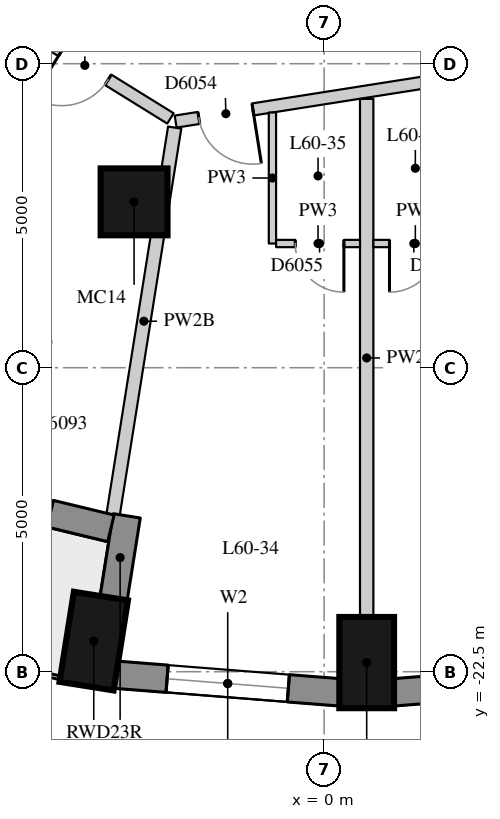
"""IFC4 building model, lengths in metres.
Left out: names, types, materials, properties, quantities, classifications, styles, units other than length and angle.
Written with IfcOpenShell. Run it as: python <this file> out.ifc"""

import sys

from ifc_helpers import new_model, si_unit, direction, frame, frame_2d, origin, origin_2d, place, context, subcontext, project, spatial, rectangle, extrude, element, fill, save


model = new_model("IFC4")
c1 = context("Model", 3, precision=1e-05, world=origin(), true_north=direction((0.0, 1.0)))
c2 = subcontext(c1, "Body", "Model", "MODEL_VIEW")
j1 = project(units=[si_unit("LENGTHUNIT", "METRE"), si_unit("PLANEANGLEUNIT", "RADIAN")], contexts=[c1])
p1 = place(None, origin())
s1 = spatial("IfcSite", under=j1, at=p1, CompositionType="ELEMENT")
p2 = place(p1, origin())
s2 = spatial("IfcBuilding", under=s1, at=p2, CompositionType="ELEMENT")
p3 = place(p2, frame((0.0, 0.0, 212.3)))
s3 = spatial("IfcBuildingStorey", under=s2, at=p3, CompositionType="ELEMENT", Elevation=212.3)
for number, where, z_axis, x_axis in (
    (1, (-3.789, -21.997, 0.0), (0.0, 0.0, 1.0), (-0.157, -0.988, 0.0)),
    (2, (0.7, -22.35, 0.0), (0.0, 0.0, 1.0), (0.0, -1.0, 0.0)),
):
    element("IfcColumn", number, at=place(p3, frame(where, z_axis=z_axis, x_axis=x_axis)), inside=s3, PredefinedType="COLUMN", context=c2, shape_type="SweptSolid", body=[
        extrude(rectangle(XDim=1.5, YDim=0.9, at=origin_2d()), origin(), (0.0, 0.0, 1.0), 3.3),
    ])
p4 = place(p3, frame((-3.126, -14.772, 0.0), z_axis=(0.0, 0.0, 1.0), x_axis=(1.0, 0.0, 0.0)))
e3 = element("IfcColumn", 3, at=p4, inside=s3, PredefinedType="COLUMN", context=c2, shape_type="SweptSolid", body=[
    extrude(rectangle(XDim=1.1, YDim=1.1, at=origin_2d()), origin(), (0.0, 0.0, 1.0), 3.3),
])
p5 = place(p3, frame((-3.441, -22.548, 0.0), z_axis=(0.0, 0.0, 1.0), x_axis=(0.996913971077, -0.078501810629, 0.0)))
e4 = element("IfcWall", 4, at=p5, inside=s3, PredefinedType="SOLIDWALL", context=c2, shape_type="SweptSolid", body=[
    extrude(rectangle(XDim=3.723, YDim=0.45, at=frame_2d((1.861, 0.0))), origin(), (0.0, 0.0, 1.0), 3.02),
])
p6 = place(p5, frame((0.861, 0.0, 0.4)))
e5 = element("IfcOpeningElement", 5, at=p6, cuts=e4, PredefinedType="OPENING", context=c2, shape_type="SweptSolid", body=[
    extrude(rectangle(XDim=2.0, YDim=1.75, at=frame_2d((1.0, 0.875))), frame((0.0, 0.235, 0.0), z_axis=(0.0, -1.0, 0.0), x_axis=(1.0, 0.0, 0.0)), (0.0, 0.0, 1.0), 0.47),
])
p7 = place(p3, frame((1.13, -22.841, 0.0), z_axis=(0.0, 0.0, 1.0), x_axis=(0.996913566885, 0.078506943392, 0.0)))
e6 = element("IfcWall", 6, at=p7, inside=s3, PredefinedType="SOLIDWALL", context=c2, shape_type="SweptSolid", body=[
    extrude(rectangle(XDim=3.722, YDim=0.45, at=frame_2d((1.861, 0.0))), origin(), (0.0, 0.0, 1.0), 3.02),
])
p8 = place(p7, frame((0.861, 0.0, 0.4)))
e7 = element("IfcOpeningElement", 7, at=p8, cuts=e6, PredefinedType="OPENING", context=c2, shape_type="SweptSolid", body=[
    extrude(rectangle(XDim=2.0, YDim=1.75, at=frame_2d((1.0, 0.875))), frame((0.0, 0.235, 0.0), z_axis=(0.0, -1.0, 0.0), x_axis=(1.0, 0.0, 0.0)), (0.0, 0.0, 1.0), 0.47),
])
p9 = place(p3, frame((-3.464, -21.309, 0.0), z_axis=(0.0, 0.0, 1.0), x_axis=(0.157161757203, 0.98757287431, 0.0)))
e8 = element("IfcWall", 8, at=p9, inside=s3, PredefinedType="SOLIDWALL", context=c2, shape_type="SweptSolid", body=[
    extrude(rectangle(XDim=1.39, YDim=0.45, at=frame_2d((0.695, 0.0))), origin(), (0.0, 0.0, 1.0), 2.57),
])
p10 = place(p3, frame((-7.596, -19.154, 0.0), z_axis=(0.0, 0.0, 1.0), x_axis=(0.972004107579, -0.234963858602, 0.0)))
e9 = element("IfcWall", 9, at=p10, inside=s3, PredefinedType="SOLIDWALL", context=c2, shape_type="SweptSolid", body=[
    extrude(rectangle(XDim=4.207, YDim=0.45, at=frame_2d((2.104, 0.0))), origin(), (0.0, 0.0, 1.0), 3.02),
])
p11 = place(p10, frame((1.029, 0.0, 0.4)))
e10 = element("IfcOpeningElement", 10, at=p11, cuts=e9, PredefinedType="OPENING", context=c2, shape_type="SweptSolid", body=[
    extrude(rectangle(XDim=1.0, YDim=1.75, at=frame_2d((0.5, 0.875))), frame((0.0, 0.235, 0.0), z_axis=(0.0, -1.0, 0.0), x_axis=(1.0, 0.0, 0.0)), (0.0, 0.0, 1.0), 0.47),
])
p12 = place(p10, frame((2.179, 0.0, 0.0)))
e11 = element("IfcOpeningElement", 11, at=p12, cuts=e9, PredefinedType="OPENING", context=c2, shape_type="SweptSolid", body=[
    extrude(rectangle(XDim=1.0, YDim=2.15, at=frame_2d((0.5, 1.075))), frame((0.0, 0.235, 0.0), z_axis=(0.0, -1.0, 0.0), x_axis=(1.0, 0.0, 0.0)), (0.0, 0.0, 1.0), 0.47),
])
p13 = place(p3, frame((9.306, -11.603, 0.0), z_axis=(0.0, 0.0, 1.0), x_axis=(-0.987842562114, -0.155457622769, 0.0)))
e12 = element("IfcWall", 12, at=p13, inside=s3, PredefinedType="PARTITIONING", context=c2, shape_type="SweptSolid", body=[
    extrude(rectangle(XDim=11.893, YDim=0.2, at=frame_2d((5.947, 0.0))), origin(), (0.0, 0.0, 1.0), 3.02),
])
p14 = place(p13, frame((10.607, 0.0, 0.0)))
e13 = element("IfcOpeningElement", 13, at=p14, cuts=e12, PredefinedType="OPENING", context=c2, shape_type="SweptSolid", body=[
    extrude(rectangle(XDim=0.9, YDim=2.1, at=frame_2d((0.45, 1.05))), frame((0.0, 0.11, 0.0), z_axis=(0.0, -1.0, 0.0), x_axis=(1.0, 0.0, 0.0)), (0.0, 0.0, 1.0), 0.22),
])
p15 = place(p13, frame((5.829, 0.0, 0.0)))
e14 = element("IfcOpeningElement", 14, at=p15, cuts=e12, PredefinedType="OPENING", context=c2, shape_type="SweptSolid", body=[
    extrude(rectangle(XDim=0.9, YDim=2.1, at=frame_2d((0.45, 1.05))), frame((0.0, 0.11, 0.0), z_axis=(0.0, -1.0, 0.0), x_axis=(1.0, 0.0, 0.0)), (0.0, 0.0, 1.0), 0.22),
])
p16 = place(p13, frame((4.669, 0.0, 0.0)))
e15 = element("IfcOpeningElement", 15, at=p16, cuts=e12, PredefinedType="OPENING", context=c2, shape_type="SweptSolid", body=[
    extrude(rectangle(XDim=0.9, YDim=2.1, at=frame_2d((0.45, 1.05))), frame((0.0, 0.11, 0.0), z_axis=(0.0, -1.0, 0.0), x_axis=(1.0, 0.0, 0.0)), (0.0, 0.0, 1.0), 0.22),
])
p17 = place(p13, frame((0.14, 0.0, 0.0)))
e16 = element("IfcOpeningElement", 16, at=p17, cuts=e12, PredefinedType="OPENING", context=c2, shape_type="SweptSolid", body=[
    extrude(rectangle(XDim=1.1, YDim=2.1, at=frame_2d((0.55, 1.05))), frame((0.0, 0.11, 0.0), z_axis=(0.0, -1.0, 0.0), x_axis=(1.0, 0.0, 0.0)), (0.0, 0.0, 1.0), 0.22),
])
p18 = place(p3, frame((-2.528, -13.4, 0.0), z_axis=(0.0, 0.0, 1.0), x_axis=(-0.850088088191, 0.526640524757, 0.0)))
e17 = element("IfcWall", 17, at=p18, inside=s3, PredefinedType="PARTITIONING", context=c2, shape_type="SweptSolid", body=[
    extrude(rectangle(XDim=6.084, YDim=0.2, at=frame_2d((3.042, 0.0))), origin(), (0.0, 0.0, 1.0), 3.02),
])
p19 = place(p18, frame((4.031, 0.0, 0.0)))
e18 = element("IfcOpeningElement", 18, at=p19, cuts=e17, PredefinedType="OPENING", context=c2, shape_type="SweptSolid", body=[
    extrude(rectangle(XDim=1.1, YDim=2.1, at=frame_2d((0.55, 1.05))), frame((0.0, 0.11, 0.0), z_axis=(0.0, -1.0, 0.0), x_axis=(1.0, 0.0, 0.0)), (0.0, 0.0, 1.0), 0.22),
])
p20 = place(p18, frame((1.206, 0.0, 0.0)))
e19 = element("IfcOpeningElement", 19, at=p20, cuts=e17, PredefinedType="OPENING", context=c2, shape_type="SweptSolid", body=[
    extrude(rectangle(XDim=0.9, YDim=2.1, at=frame_2d((0.45, 1.05))), frame((0.0, 0.11, 0.0), z_axis=(0.0, -1.0, 0.0), x_axis=(1.0, 0.0, 0.0)), (0.0, 0.0, 1.0), 0.22),
])
p21 = place(p3, frame((-3.471, -19.919, 0.0), z_axis=(0.0, 0.0, 1.0), x_axis=(0.157082319053, 0.987585512774, 0.0)))
e20 = element("IfcWall", 20, at=p21, inside=s3, PredefinedType="PARTITIONING", context=c2, shape_type="SweptSolid", body=[
    extrude(rectangle(XDim=6.448, YDim=0.22, at=frame_2d((3.224, 0.0))), origin(), (0.0, 0.0, 1.0), 2.57),
])
p22 = place(p3, frame((0.7, -21.6, 0.0), z_axis=(0.0, 0.0, 1.0), x_axis=(0.0, 1.0, 0.0)))
e21 = element("IfcWall", 21, at=p22, inside=s3, PredefinedType="PARTITIONING", context=c2, shape_type="SweptSolid", body=[
    extrude(rectangle(XDim=8.521, YDim=0.22, at=frame_2d((4.261, 0.0))), origin(), (0.0, 0.0, 1.0), 2.57),
])
p23 = place(p3, frame((-0.85, -13.303, 0.0), z_axis=(0.0, 0.0, 1.0), x_axis=(0.0, -1.0, 0.0)))
e22 = element("IfcWall", 22, at=p23, inside=s3, PredefinedType="PARTITIONING", context=c2, shape_type="SweptSolid", body=[
    extrude(rectangle(XDim=2.155, YDim=0.12, at=frame_2d((1.077, 0.0))), origin(), (0.0, 0.0, 1.0), 3.02),
])
p24 = place(p3, frame((-0.79, -15.458, 0.0), z_axis=(0.0, 0.0, 1.0), x_axis=(1.0, 0.0, 0.0)))
e23 = element("IfcWall", 23, at=p24, inside=s3, PredefinedType="PARTITIONING", context=c2, shape_type="SweptSolid", body=[
    extrude(rectangle(XDim=1.38, YDim=0.12, at=frame_2d((0.69, 0.0))), origin(), (0.0, 0.0, 1.0), 3.02),
])
p25 = place(p24, frame((0.315, 0.0, 0.0)))
e24 = element("IfcOpeningElement", 24, at=p25, cuts=e23, PredefinedType="OPENING", context=c2, shape_type="SweptSolid", body=[
    extrude(rectangle(XDim=0.8, YDim=2.1, at=frame_2d((0.4, 1.05))), frame((0.0, 0.07, 0.0), z_axis=(0.0, -1.0, 0.0), x_axis=(1.0, 0.0, 0.0)), (0.0, 0.0, 1.0), 0.14),
])
p26 = place(p3, frame((2.19, -15.458, 0.0), z_axis=(0.0, 0.0, 1.0), x_axis=(-1.0, 0.0, 0.0)))
e25 = element("IfcWall", 25, at=p26, inside=s3, PredefinedType="PARTITIONING", context=c2, shape_type="SweptSolid", body=[
    extrude(rectangle(XDim=1.38, YDim=0.12, at=frame_2d((0.69, 0.0))), origin(), (0.0, 0.0, 1.0), 3.02),
])
p27 = place(p26, frame((0.315, 0.0, 0.0)))
e26 = element("IfcOpeningElement", 26, at=p27, cuts=e25, PredefinedType="OPENING", context=c2, shape_type="SweptSolid", body=[
    extrude(rectangle(XDim=0.8, YDim=2.1, at=frame_2d((0.4, 1.05))), frame((0.0, 0.07, 0.0), z_axis=(0.0, -1.0, 0.0), x_axis=(1.0, 0.0, 0.0)), (0.0, 0.0, 1.0), 0.14),
])
p28 = place(p6, origin())
e27 = element("IfcWindow", 27, at=p28, inside=s3, PartitioningType="SINGLE_PANEL", PredefinedType="WINDOW", context=c2, shape_type="SweptSolid", body=[
    extrude(rectangle(XDim=2.0, YDim=1.75, at=frame_2d((1.0, 0.875))), frame((0.0, 0.035, 0.0), z_axis=(0.0, -1.0, 0.0), x_axis=(1.0, 0.0, 0.0)), (0.0, 0.0, 1.0), 0.06),
])
fill(e5, e27)
p29 = place(p20, origin())
e28 = element("IfcDoor", 28, at=p29, inside=s3, OperationType="SINGLE_SWING_RIGHT", PredefinedType="DOOR", context=c2, shape_type="SweptSolid", body=[
    extrude(rectangle(XDim=0.9, YDim=2.1, at=frame_2d((0.45, 1.05))), frame((0.0, 0.025, 0.0), z_axis=(0.0, -1.0, 0.0), x_axis=(1.0, 0.0, 0.0)), (0.0, 0.0, 1.0), 0.05),
])
fill(e19, e28)
p30 = place(p14, origin())
e29 = element("IfcDoor", 29, at=p30, inside=s3, OperationType="SINGLE_SWING_LEFT", PredefinedType="DOOR", context=c2, shape_type="SweptSolid", body=[
    extrude(rectangle(XDim=0.9, YDim=2.1, at=frame_2d((0.45, 1.05))), frame((0.0, 0.025, 0.0), z_axis=(0.0, -1.0, 0.0), x_axis=(1.0, 0.0, 0.0)), (0.0, 0.0, 1.0), 0.05),
])
fill(e13, e29)
p31 = place(p25, origin())
e30 = element("IfcDoor", 30, at=p31, inside=s3, OperationType="SINGLE_SWING_LEFT", PredefinedType="DOOR", context=c2, shape_type="SweptSolid", body=[
    extrude(rectangle(XDim=0.8, YDim=2.1, at=frame_2d((0.4, 1.05))), frame((0.0, 0.025, 0.0), z_axis=(0.0, -1.0, 0.0), x_axis=(1.0, 0.0, 0.0)), (0.0, 0.0, 1.0), 0.05),
])
fill(e24, e30)
p32 = place(p27, origin())
e31 = element("IfcDoor", 31, at=p32, inside=s3, OperationType="SINGLE_SWING_RIGHT", PredefinedType="DOOR", context=c2, shape_type="SweptSolid", body=[
    extrude(rectangle(XDim=0.8, YDim=2.1, at=frame_2d((0.4, 1.05))), frame((0.0, 0.025, 0.0), z_axis=(0.0, -1.0, 0.0), x_axis=(1.0, 0.0, 0.0)), (0.0, 0.0, 1.0), 0.05),
])
fill(e26, e31)
save(model, sys.argv[1])
